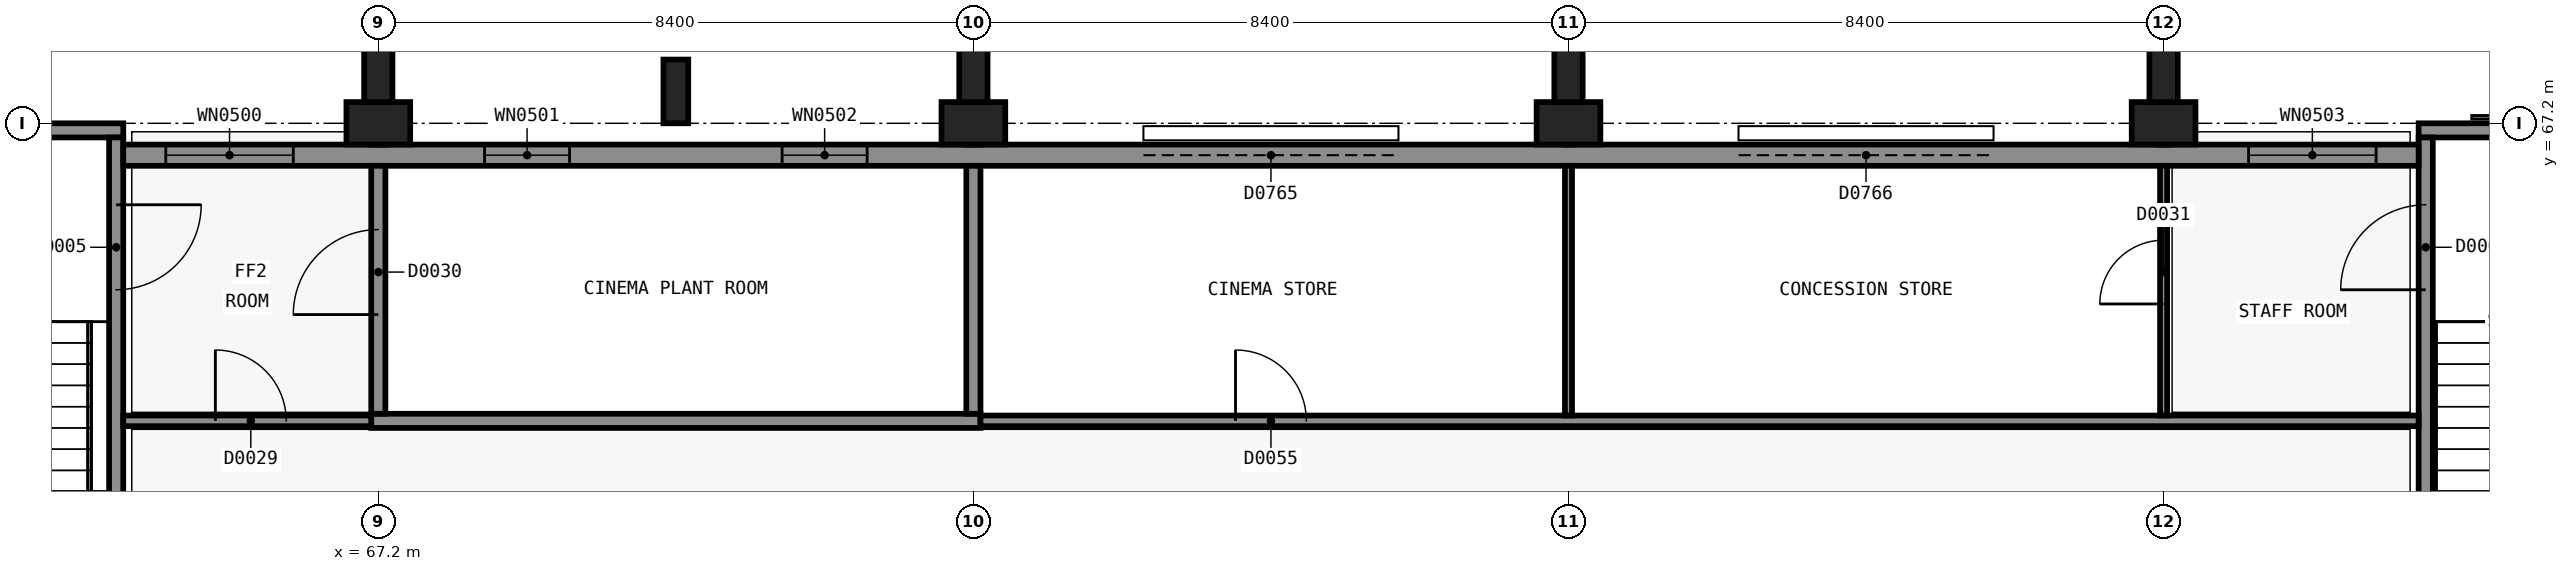
"""IFC4 building model, lengths in metres.
Left out: names, types, materials, properties, quantities, classifications, styles, units other than length and angle.
Written with IfcOpenShell. Run it as: python <this file> out.ifc"""

import sys

from ifc_helpers import new_model, si_unit, direction, frame, frame_2d, origin, origin_2d, place, context, subcontext, project, spatial, rectangle, extrude, element, fill, save


model = new_model("IFC4")
c1 = context("Model", 3, precision=1e-05, world=origin(), true_north=direction((0.0, 1.0)))
c2 = subcontext(c1, "Body", "Model", "MODEL_VIEW")
j1 = project(units=[si_unit("LENGTHUNIT", "METRE"), si_unit("PLANEANGLEUNIT", "RADIAN")], contexts=[c1])
p1 = place(None, origin())
s1 = spatial("IfcSite", under=j1, at=p1, CompositionType="ELEMENT")
p2 = place(p1, origin())
s2 = spatial("IfcBuilding", under=s1, at=p2, CompositionType="ELEMENT")
p3 = place(p2, origin())
s3 = spatial("IfcBuildingStorey", under=s2, at=p3, CompositionType="ELEMENT", Elevation=0.0)
p4 = place(p3, frame((58.8, 67.1, -0.3), z_axis=(0.0, 0.0, 1.0), x_axis=(1.0, 0.0, 0.0)))
e1 = element("IfcWall", 1, at=p4, inside=s3, PredefinedType="SHEAR", context=c2, shape_type="SweptSolid", body=[
    extrude(rectangle(XDim=4.8, YDim=0.2, at=frame_2d((2.4, 0.0))), origin(), (0.0, 0.0, 1.0), 5.7),
])
p5 = place(p4, frame((1.85, 0.0, 0.0)))
e2 = element("IfcOpeningElement", 2, at=p5, cuts=e1, PredefinedType="OPENING", context=c2, shape_type="SweptSolid", body=[
    extrude(rectangle(XDim=1.1, YDim=2.2, at=frame_2d((0.55, 1.1))), frame((0.0, 0.11, 0.0), z_axis=(0.0, -1.0, 0.0), x_axis=(1.0, 0.0, 0.0)), (0.0, 0.0, 1.0), 0.22),
])
p6 = place(p3, frame((63.5, 67.0, -0.3), z_axis=(0.0, 0.0, 1.0), x_axis=(0.0, -1.0, 0.0)))
e3 = element("IfcWall", 3, at=p6, inside=s3, PredefinedType="SHEAR", context=c2, shape_type="SweptSolid", body=[
    extrude(rectangle(XDim=9.2, YDim=0.2, at=frame_2d((4.6, 0.0))), origin(), (0.0, 0.0, 1.0), 5.7),
])
p7 = place(p6, frame((0.95, 0.0, 0.3)))
e4 = element("IfcOpeningElement", 4, at=p7, cuts=e3, PredefinedType="OPENING", context=c2, shape_type="SweptSolid", body=[
    extrude(rectangle(XDim=1.2, YDim=2.1, at=frame_2d((0.6, 1.05))), frame((0.0, 0.11, 0.0), z_axis=(0.0, -1.0, 0.0), x_axis=(1.0, 0.0, 0.0)), (0.0, 0.0, 1.0), 0.22),
])
p8 = place(p3, frame((96.0, 67.1, -0.3), z_axis=(0.0, 0.0, 1.0), x_axis=(1.0, 0.0, 0.0)))
e5 = element("IfcWall", 5, at=p8, inside=s3, PredefinedType="SHEAR", context=c2, shape_type="SweptSolid", body=[
    extrude(rectangle(XDim=4.8, YDim=0.2, at=frame_2d((2.4, 0.0))), origin(), (0.0, 0.0, 1.0), 5.7),
])
p9 = place(p8, frame((1.85, 0.0, 0.0)))
e6 = element("IfcOpeningElement", 6, at=p9, cuts=e5, PredefinedType="OPENING", context=c2, shape_type="SweptSolid", body=[
    extrude(rectangle(XDim=1.1, YDim=2.2, at=frame_2d((0.55, 1.1))), frame((0.0, 0.11, 0.0), z_axis=(0.0, -1.0, 0.0), x_axis=(1.0, 0.0, 0.0)), (0.0, 0.0, 1.0), 0.22),
])
p10 = place(p3, frame((96.1, 57.8, -0.3), z_axis=(0.0, 0.0, 1.0), x_axis=(0.0, 1.0, 0.0)))
e7 = element("IfcWall", 7, at=p10, inside=s3, PredefinedType="SHEAR", context=c2, shape_type="SweptSolid", body=[
    extrude(rectangle(XDim=9.2, YDim=0.2, at=frame_2d((4.6, 0.0))), origin(), (0.0, 0.0, 1.0), 5.7),
])
p11 = place(p10, frame((7.05, 0.0, 0.3)))
e8 = element("IfcOpeningElement", 8, at=p11, cuts=e7, PredefinedType="OPENING", context=c2, shape_type="SweptSolid", body=[
    extrude(rectangle(XDim=1.2, YDim=2.1, at=frame_2d((0.6, 1.05))), frame((0.0, 0.11, 0.0), z_axis=(0.0, -1.0, 0.0), x_axis=(1.0, 0.0, 0.0)), (0.0, 0.0, 1.0), 0.22),
])
for number, where, z_axis, x_axis in (
    (9, (67.2, 67.2, -0.3), (0.0, 0.0, 1.0), (1.0, 0.0, 0.0)),
    (10, (75.6, 67.2, -0.3), (0.0, 0.0, 1.0), (1.0, 0.0, 0.0)),
    (11, (84.0, 67.2, -0.3), (0.0, 0.0, 1.0), (1.0, 0.0, 0.0)),
    (12, (92.4, 67.2, -0.3), (0.0, 0.0, 1.0), (1.0, 0.0, 0.0)),
):
    element("IfcColumn", number, at=place(p3, frame(where, z_axis=z_axis, x_axis=x_axis)), inside=s3, PredefinedType="COLUMN", context=c2, shape_type="SweptSolid", body=[
        extrude(rectangle(XDim=0.9, YDim=0.6, at=origin_2d()), origin(), (0.0, 0.0, 1.0), 5.7),
    ])
p12 = place(p3, frame((63.6, 66.75, 0.0), z_axis=(0.0, 0.0, 1.0), x_axis=(1.0, 0.0, 0.0)))
e13 = element("IfcWall", 13, at=p12, inside=s3, PredefinedType="SOLIDWALL", context=c2, shape_type="SweptSolid", body=[
    extrude(rectangle(XDim=32.4, YDim=0.3, at=frame_2d((16.2, 0.0))), origin(), (0.0, 0.0, 1.0), 5.1),
])
p13 = place(p12, frame((14.4, 0.0, 0.0)))
e14 = element("IfcOpeningElement", 14, at=p13, cuts=e13, PredefinedType="OPENING", context=c2, shape_type="SweptSolid", body=[
    extrude(rectangle(XDim=3.6, YDim=3.0, at=frame_2d((1.8, 1.5))), frame((0.0, 0.16, 0.0), z_axis=(0.0, -1.0, 0.0), x_axis=(1.0, 0.0, 0.0)), (0.0, 0.0, 1.0), 0.32),
])
p14 = place(p12, frame((22.8, 0.0, 0.0)))
e15 = element("IfcOpeningElement", 15, at=p14, cuts=e13, PredefinedType="OPENING", context=c2, shape_type="SweptSolid", body=[
    extrude(rectangle(XDim=3.6, YDim=3.0, at=frame_2d((1.8, 1.5))), frame((0.0, 0.16, 0.0), z_axis=(0.0, -1.0, 0.0), x_axis=(1.0, 0.0, 0.0)), (0.0, 0.0, 1.0), 0.32),
])
p15 = place(p12, frame((0.6, 0.0, 0.9)))
e16 = element("IfcOpeningElement", 16, at=p15, cuts=e13, PredefinedType="OPENING", context=c2, shape_type="SweptSolid", body=[
    extrude(rectangle(XDim=1.8, YDim=1.5, at=frame_2d((0.9, 0.75))), frame((0.0, 0.16, 0.0), z_axis=(0.0, -1.0, 0.0), x_axis=(1.0, 0.0, 0.0)), (0.0, 0.0, 1.0), 0.32),
])
p16 = place(p12, frame((5.1, 0.0, 0.9)))
e17 = element("IfcOpeningElement", 17, at=p16, cuts=e13, PredefinedType="OPENING", context=c2, shape_type="SweptSolid", body=[
    extrude(rectangle(XDim=1.2, YDim=1.8, at=frame_2d((0.6, 0.9))), frame((0.0, 0.16, 0.0), z_axis=(0.0, -1.0, 0.0), x_axis=(1.0, 0.0, 0.0)), (0.0, 0.0, 1.0), 0.32),
])
p17 = place(p12, frame((9.3, 0.0, 0.9)))
e18 = element("IfcOpeningElement", 18, at=p17, cuts=e13, PredefinedType="OPENING", context=c2, shape_type="SweptSolid", body=[
    extrude(rectangle(XDim=1.2, YDim=1.8, at=frame_2d((0.6, 0.9))), frame((0.0, 0.16, 0.0), z_axis=(0.0, -1.0, 0.0), x_axis=(1.0, 0.0, 0.0)), (0.0, 0.0, 1.0), 0.32),
])
p18 = place(p12, frame((30.0, 0.0, 0.9)))
e19 = element("IfcOpeningElement", 19, at=p18, cuts=e13, PredefinedType="OPENING", context=c2, shape_type="SweptSolid", body=[
    extrude(rectangle(XDim=1.8, YDim=1.5, at=frame_2d((0.9, 0.75))), frame((0.0, 0.16, 0.0), z_axis=(0.0, -1.0, 0.0), x_axis=(1.0, 0.0, 0.0)), (0.0, 0.0, 1.0), 0.32),
])
p19 = place(p3, frame((67.2, 68.1, -0.3), z_axis=(0.0, 0.0, 1.0), x_axis=(1.0, 0.0, 0.0)))
e20 = element("IfcColumn", 20, at=p19, inside=s3, PredefinedType="PILASTER", context=c2, shape_type="SweptSolid", body=[
    extrude(rectangle(XDim=0.4, YDim=1.2, at=origin_2d()), origin(), (0.0, 0.0, 1.0), 5.7),
])
p20 = place(p3, frame((71.4, 67.65, -0.3), z_axis=(0.0, 0.0, 1.0), x_axis=(1.0, 0.0, 0.0)))
e21 = element("IfcColumn", 21, at=p20, inside=s3, PredefinedType="PILASTER", context=c2, shape_type="SweptSolid", body=[
    extrude(rectangle(XDim=0.35, YDim=0.9, at=origin_2d()), origin(), (0.0, 0.0, 1.0), 5.7),
])
for number, where, z_axis, x_axis in (
    (22, (75.6, 68.1, -0.3), (0.0, 0.0, 1.0), (1.0, 0.0, 0.0)),
    (23, (84.0, 68.1, -0.3), (0.0, 0.0, 1.0), (1.0, 0.0, 0.0)),
    (24, (92.4, 68.1, -0.3), (0.0, 0.0, 1.0), (1.0, 0.0, 0.0)),
):
    element("IfcColumn", number, at=place(p3, frame(where, z_axis=z_axis, x_axis=x_axis)), inside=s3, PredefinedType="PILASTER", context=c2, shape_type="SweptSolid", body=[
        extrude(rectangle(XDim=0.4, YDim=1.2, at=origin_2d()), origin(), (0.0, 0.0, 1.0), 5.7),
    ])
p21 = place(p3, frame((67.1, 63.0, 0.0), z_axis=(0.0, 0.0, 1.0), x_axis=(1.0, 0.0, 0.0)))
e25 = element("IfcWall", 25, at=p21, inside=s3, PredefinedType="SOLIDWALL", context=c2, shape_type="SweptSolid", body=[
    extrude(rectangle(XDim=8.6, YDim=0.2, at=frame_2d((4.3, 0.0))), origin(), (0.0, 0.0, 1.0), 4.4),
])
p22 = place(p3, frame((67.2, 63.1, 0.0), z_axis=(0.0, 0.0, 1.0), x_axis=(0.0, 1.0, 0.0)))
e26 = element("IfcWall", 26, at=p22, inside=s3, PredefinedType="SOLIDWALL", context=c2, shape_type="SweptSolid", body=[
    extrude(rectangle(XDim=3.5, YDim=0.2, at=frame_2d((1.75, 0.0))), origin(), (0.0, 0.0, 1.0), 4.4),
])
p23 = place(p22, frame((1.4, 0.0, 0.0)))
e27 = element("IfcOpeningElement", 27, at=p23, cuts=e26, PredefinedType="OPENING", context=c2, shape_type="SweptSolid", body=[
    extrude(rectangle(XDim=1.2, YDim=2.1, at=frame_2d((0.6, 1.05))), frame((0.0, 0.11, 0.0), z_axis=(0.0, -1.0, 0.0), x_axis=(1.0, 0.0, 0.0)), (0.0, 0.0, 1.0), 0.22),
])
p24 = place(p3, frame((67.2, 66.9, 0.0), z_axis=(0.0, 0.0, 1.0), x_axis=(0.0, 1.0, 0.0)))
e28 = element("IfcWall", 28, at=p24, inside=s3, PredefinedType="SOLIDWALL", context=c2, shape_type="SweptSolid", body=[
    extrude(rectangle(XDim=0.4, YDim=0.2, at=frame_2d((0.2, 0.0))), origin(), (0.0, 0.0, 1.0), 4.4),
])
p25 = place(p3, frame((75.6, 63.1, 0.0), z_axis=(0.0, 0.0, 1.0), x_axis=(0.0, 1.0, 0.0)))
e29 = element("IfcWall", 29, at=p25, inside=s3, PredefinedType="SOLIDWALL", context=c2, shape_type="SweptSolid", body=[
    extrude(rectangle(XDim=3.5, YDim=0.2, at=frame_2d((1.75, 0.0))), origin(), (0.0, 0.0, 1.0), 4.4),
])
p26 = place(p3, frame((75.6, 66.9, 0.0), z_axis=(0.0, 0.0, 1.0), x_axis=(0.0, 1.0, 0.0)))
e30 = element("IfcWall", 30, at=p26, inside=s3, PredefinedType="SOLIDWALL", context=c2, shape_type="SweptSolid", body=[
    extrude(rectangle(XDim=0.4, YDim=0.2, at=frame_2d((0.2, 0.0))), origin(), (0.0, 0.0, 1.0), 4.4),
])
p27 = place(p3, frame((63.6, 63.0, 0.0), z_axis=(0.0, 0.0, 1.0), x_axis=(1.0, 0.0, 0.0)))
e31 = element("IfcWall", 31, at=p27, inside=s3, PredefinedType="PARTITIONING", context=c2, shape_type="SweptSolid", body=[
    extrude(rectangle(XDim=3.5, YDim=0.15, at=frame_2d((1.75, 0.0))), origin(), (0.0, 0.0, 1.0), 4.4),
])
p28 = place(p27, frame((1.3, 0.0, 0.0)))
e32 = element("IfcOpeningElement", 32, at=p28, cuts=e31, PredefinedType="OPENING", context=c2, shape_type="SweptSolid", body=[
    extrude(rectangle(XDim=1.0, YDim=2.1, at=frame_2d((0.5, 1.05))), frame((0.0, 0.085, 0.0), z_axis=(0.0, -1.0, 0.0), x_axis=(1.0, 0.0, 0.0)), (0.0, 0.0, 1.0), 0.17),
])
p29 = place(p3, frame((75.7, 63.0, 0.0), z_axis=(0.0, 0.0, 1.0), x_axis=(1.0, 0.0, 0.0)))
e33 = element("IfcWall", 33, at=p29, inside=s3, PredefinedType="PARTITIONING", context=c2, shape_type="SweptSolid", body=[
    extrude(rectangle(XDim=20.3, YDim=0.15, at=frame_2d((10.15, 0.0))), origin(), (0.0, 0.0, 1.0), 4.4),
])
p30 = place(p29, frame((3.6, 0.0, 0.0)))
e34 = element("IfcOpeningElement", 34, at=p30, cuts=e33, PredefinedType="OPENING", context=c2, shape_type="SweptSolid", body=[
    extrude(rectangle(XDim=1.0, YDim=2.1, at=frame_2d((0.5, 1.05))), frame((0.0, 0.085, 0.0), z_axis=(0.0, -1.0, 0.0), x_axis=(1.0, 0.0, 0.0)), (0.0, 0.0, 1.0), 0.17),
])
p31 = place(p3, frame((84.0, 63.075, 0.0), z_axis=(0.0, 0.0, 1.0), x_axis=(0.0, 1.0, 0.0)))
e35 = element("IfcWall", 35, at=p31, inside=s3, PredefinedType="PARTITIONING", context=c2, shape_type="SweptSolid", body=[
    extrude(rectangle(XDim=3.525, YDim=0.1, at=frame_2d((1.763, 0.0))), origin(), (0.0, 0.0, 1.0), 4.4),
])
p32 = place(p3, frame((84.0, 66.9, 0.0), z_axis=(0.0, 0.0, 1.0), x_axis=(0.0, 1.0, 0.0)))
e36 = element("IfcWall", 36, at=p32, inside=s3, PredefinedType="PARTITIONING", context=c2, shape_type="SweptSolid", body=[
    extrude(rectangle(XDim=0.35, YDim=0.1, at=frame_2d((0.175, 0.0))), origin(), (0.0, 0.0, 1.0), 4.4),
])
p33 = place(p3, frame((92.4, 63.075, 0.0), z_axis=(0.0, 0.0, 1.0), x_axis=(0.0, 1.0, 0.0)))
e37 = element("IfcWall", 37, at=p33, inside=s3, PredefinedType="PARTITIONING", context=c2, shape_type="SweptSolid", body=[
    extrude(rectangle(XDim=3.525, YDim=0.1, at=frame_2d((1.763, 0.0))), origin(), (0.0, 0.0, 1.0), 4.4),
])
p34 = place(p33, frame((1.575, 0.0, 0.0)))
e38 = element("IfcOpeningElement", 38, at=p34, cuts=e37, PredefinedType="OPENING", context=c2, shape_type="SweptSolid", body=[
    extrude(rectangle(XDim=0.9, YDim=2.1, at=frame_2d((0.45, 1.05))), frame((0.0, 0.06, 0.0), z_axis=(0.0, -1.0, 0.0), x_axis=(1.0, 0.0, 0.0)), (0.0, 0.0, 1.0), 0.12),
])
p35 = place(p3, frame((92.4, 66.9, 0.0), z_axis=(0.0, 0.0, 1.0), x_axis=(0.0, 1.0, 0.0)))
e39 = element("IfcWall", 39, at=p35, inside=s3, PredefinedType="PARTITIONING", context=c2, shape_type="SweptSolid", body=[
    extrude(rectangle(XDim=0.35, YDim=0.1, at=frame_2d((0.175, 0.0))), origin(), (0.0, 0.0, 1.0), 4.4),
])
p36 = place(p13, origin())
e40 = element("IfcDoor", 40, at=p36, inside=s3, OperationType="SINGLE_SWING_LEFT", PredefinedType="GATE", context=c2, shape_type="SweptSolid", body=[
    extrude(rectangle(XDim=3.6, YDim=3.0, at=frame_2d((1.8, 1.5))), frame((0.0, 0.025, 0.0), z_axis=(0.0, -1.0, 0.0), x_axis=(1.0, 0.0, 0.0)), (0.0, 0.0, 1.0), 0.05),
])
fill(e14, e40)
p37 = place(p14, origin())
e41 = element("IfcDoor", 41, at=p37, inside=s3, OperationType="SINGLE_SWING_LEFT", PredefinedType="GATE", context=c2, shape_type="SweptSolid", body=[
    extrude(rectangle(XDim=3.6, YDim=3.0, at=frame_2d((1.8, 1.5))), frame((0.0, 0.025, 0.0), z_axis=(0.0, -1.0, 0.0), x_axis=(1.0, 0.0, 0.0)), (0.0, 0.0, 1.0), 0.05),
])
fill(e15, e41)
p38 = place(p15, origin())
e42 = element("IfcWindow", 42, at=p38, inside=s3, PartitioningType="SINGLE_PANEL", PredefinedType="WINDOW", context=c2, shape_type="SweptSolid", body=[
    extrude(rectangle(XDim=1.8, YDim=1.5, at=frame_2d((0.9, 0.75))), frame((0.0, 0.03, 0.0), z_axis=(0.0, -1.0, 0.0), x_axis=(1.0, 0.0, 0.0)), (0.0, 0.0, 1.0), 0.06),
])
fill(e16, e42)
p39 = place(p16, origin())
e43 = element("IfcWindow", 43, at=p39, inside=s3, PartitioningType="SINGLE_PANEL", PredefinedType="WINDOW", context=c2, shape_type="SweptSolid", body=[
    extrude(rectangle(XDim=1.2, YDim=1.8, at=frame_2d((0.6, 0.9))), frame((0.0, 0.03, 0.0), z_axis=(0.0, -1.0, 0.0), x_axis=(1.0, 0.0, 0.0)), (0.0, 0.0, 1.0), 0.06),
])
fill(e17, e43)
p40 = place(p17, origin())
e44 = element("IfcWindow", 44, at=p40, inside=s3, PartitioningType="SINGLE_PANEL", PredefinedType="WINDOW", context=c2, shape_type="SweptSolid", body=[
    extrude(rectangle(XDim=1.2, YDim=1.8, at=frame_2d((0.6, 0.9))), frame((0.0, 0.03, 0.0), z_axis=(0.0, -1.0, 0.0), x_axis=(1.0, 0.0, 0.0)), (0.0, 0.0, 1.0), 0.06),
])
fill(e18, e44)
p41 = place(p18, origin())
e45 = element("IfcWindow", 45, at=p41, inside=s3, PartitioningType="SINGLE_PANEL", PredefinedType="WINDOW", context=c2, shape_type="SweptSolid", body=[
    extrude(rectangle(XDim=1.8, YDim=1.5, at=frame_2d((0.9, 0.75))), frame((0.0, 0.03, 0.0), z_axis=(0.0, -1.0, 0.0), x_axis=(1.0, 0.0, 0.0)), (0.0, 0.0, 1.0), 0.06),
])
fill(e19, e45)
p42 = place(p7, origin())
e46 = element("IfcDoor", 46, at=p42, inside=s3, OperationType="SINGLE_SWING_RIGHT", PredefinedType="DOOR", context=c2, shape_type="SweptSolid", body=[
    extrude(rectangle(XDim=1.2, YDim=2.1, at=frame_2d((0.6, 1.05))), frame((0.0, 0.025, 0.0), z_axis=(0.0, -1.0, 0.0), x_axis=(1.0, 0.0, 0.0)), (0.0, 0.0, 1.0), 0.05),
])
fill(e4, e46)
p43 = place(p11, origin())
e47 = element("IfcDoor", 47, at=p43, inside=s3, OperationType="SINGLE_SWING_RIGHT", PredefinedType="DOOR", context=c2, shape_type="SweptSolid", body=[
    extrude(rectangle(XDim=1.2, YDim=2.1, at=frame_2d((0.6, 1.05))), frame((0.0, 0.025, 0.0), z_axis=(0.0, -1.0, 0.0), x_axis=(1.0, 0.0, 0.0)), (0.0, 0.0, 1.0), 0.05),
])
fill(e8, e47)
p44 = place(p28, origin())
e48 = element("IfcDoor", 48, at=p44, inside=s3, OperationType="SINGLE_SWING_RIGHT", PredefinedType="DOOR", context=c2, shape_type="SweptSolid", body=[
    extrude(rectangle(XDim=1.0, YDim=2.1, at=frame_2d((0.5, 1.05))), frame((0.0, 0.025, 0.0), z_axis=(0.0, -1.0, 0.0), x_axis=(1.0, 0.0, 0.0)), (0.0, 0.0, 1.0), 0.05),
])
fill(e32, e48)
p45 = place(p23, origin())
e49 = element("IfcDoor", 49, at=p45, inside=s3, OperationType="SINGLE_SWING_LEFT", PredefinedType="DOOR", context=c2, shape_type="SweptSolid", body=[
    extrude(rectangle(XDim=1.2, YDim=2.1, at=frame_2d((0.6, 1.05))), frame((0.0, 0.025, 0.0), z_axis=(0.0, -1.0, 0.0), x_axis=(1.0, 0.0, 0.0)), (0.0, 0.0, 1.0), 0.05),
])
fill(e27, e49)
p46 = place(p34, origin())
e50 = element("IfcDoor", 50, at=p46, inside=s3, OperationType="SINGLE_SWING_LEFT", PredefinedType="DOOR", context=c2, shape_type="SweptSolid", body=[
    extrude(rectangle(XDim=0.9, YDim=2.1, at=frame_2d((0.45, 1.05))), frame((0.0, 0.025, 0.0), z_axis=(0.0, -1.0, 0.0), x_axis=(1.0, 0.0, 0.0)), (0.0, 0.0, 1.0), 0.05),
])
fill(e38, e50)
p47 = place(p30, origin())
e51 = element("IfcDoor", 51, at=p47, inside=s3, OperationType="SINGLE_SWING_RIGHT", PredefinedType="DOOR", context=c2, shape_type="SweptSolid", body=[
    extrude(rectangle(XDim=1.0, YDim=2.1, at=frame_2d((0.5, 1.05))), frame((0.0, 0.025, 0.0), z_axis=(0.0, -1.0, 0.0), x_axis=(1.0, 0.0, 0.0)), (0.0, 0.0, 1.0), 0.05),
])
fill(e34, e51)
save(model, sys.argv[1])
